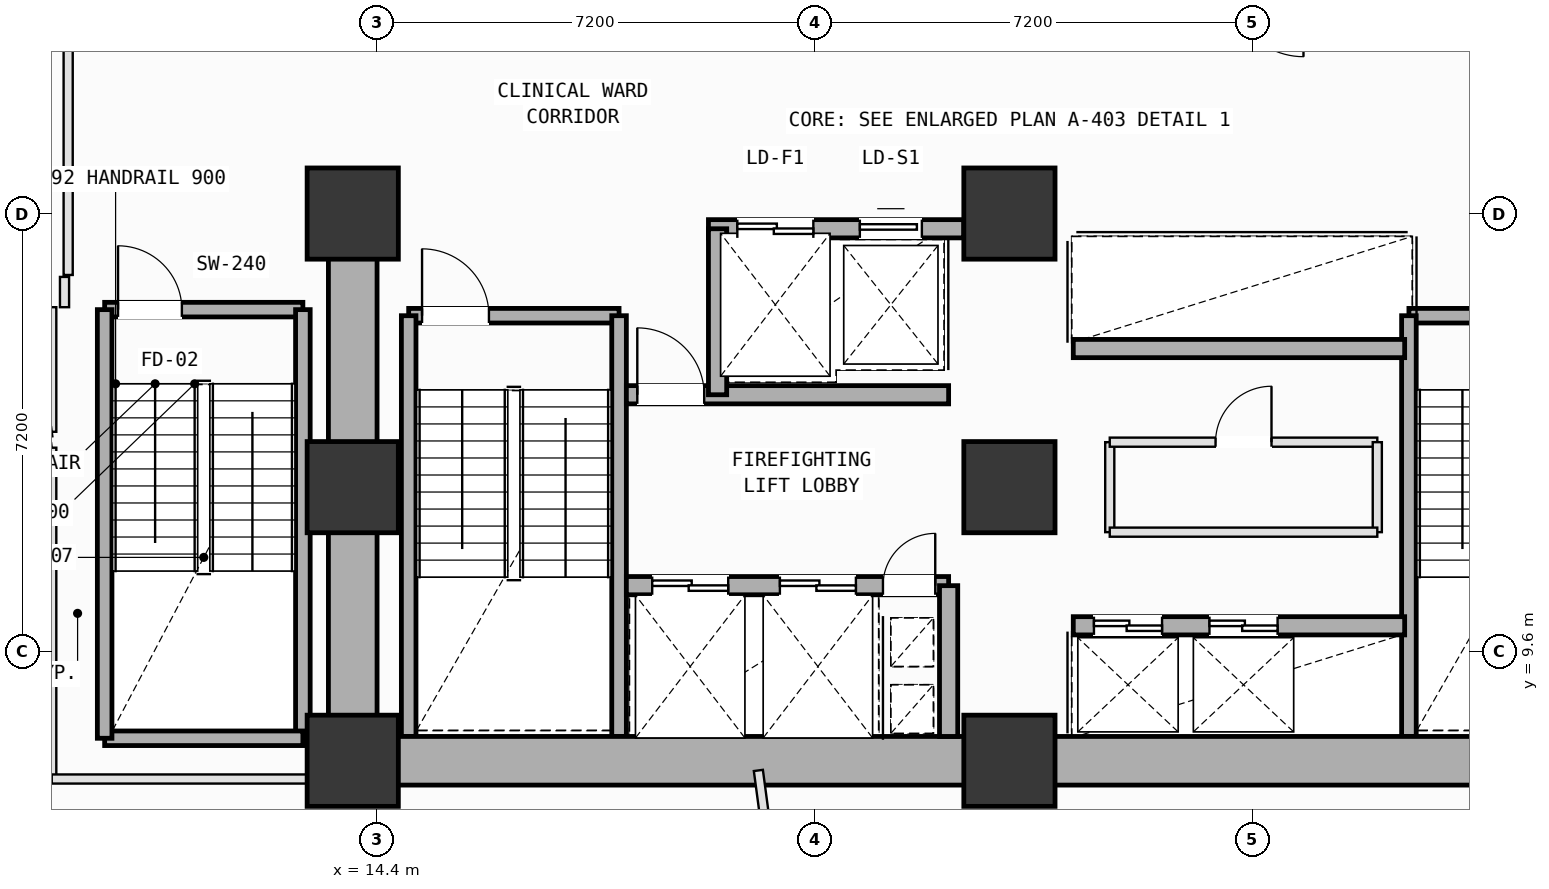
"""IFC4 building model, lengths in metres.
Left out: names, types, materials, properties, quantities, classifications, styles, units other than length and angle.
Written with IfcOpenShell. Run it as: python <this file> out.ifc"""

import sys

from ifc_helpers import new_model, si_unit, direction, frame, frame_2d, origin, origin_2d, place, context, subcontext, project, spatial, rectangle, extrude, element, fill, save


model = new_model("IFC4")
c1 = context("Model", 3, precision=1e-05, world=origin(), true_north=direction((0.0, 1.0)))
c2 = subcontext(c1, "Body", "Model", "MODEL_VIEW")
j1 = project(units=[si_unit("LENGTHUNIT", "METRE"), si_unit("PLANEANGLEUNIT", "RADIAN")], contexts=[c1])
p1 = place(None, origin())
s1 = spatial("IfcSite", under=j1, at=p1, CompositionType="ELEMENT")
p2 = place(p1, origin())
s2 = spatial("IfcBuilding", under=s1, at=p2, CompositionType="ELEMENT")
p3 = place(p2, frame((0.0, 0.0, 55.0)))
s3 = spatial("IfcBuildingStorey", under=s2, at=p3, CompositionType="ELEMENT", Elevation=55.0)
for number, where, z_axis, x_axis in (
    (1, (14.0, 7.8, 0.0), (0.0, 0.0, 1.0), (1.0, 0.0, 0.0)),
    (2, (14.0, 12.3, 0.0), (0.0, 0.0, 1.0), (1.0, 0.0, 0.0)),
    (3, (14.0, 16.8, 0.0), (0.0, 0.0, 1.0), (1.0, 0.0, 0.0)),
    (4, (24.8, 7.8, 0.0), (0.0, 0.0, 1.0), (1.0, 0.0, 0.0)),
    (5, (24.8, 12.3, 0.0), (0.0, 0.0, 1.0), (1.0, 0.0, 0.0)),
    (6, (24.8, 16.8, 0.0), (0.0, 0.0, 1.0), (1.0, 0.0, 0.0)),
):
    element("IfcColumn", number, at=place(p3, frame(where, z_axis=z_axis, x_axis=x_axis)), inside=s3, PredefinedType="COLUMN", context=c2, shape_type="SweptSolid", body=[
        extrude(rectangle(XDim=1.5, YDim=1.5, at=origin_2d()), origin(), (0.0, 0.0, 1.0), 4.0),
    ])
p4 = place(p3, frame((8.19, 7.689, 0.002), z_axis=(0.071206194671, -0.103870142695, 0.992038644054), x_axis=(-0.66508150419, 0.736263995818, 0.124827566051)))
e7 = element("IfcColumn", 7, at=p4, inside=s3, PredefinedType="COLUMN", context=c2, shape_type="SweptSolid", body=[
    extrude(rectangle(XDim=1.6, YDim=0.9, at=origin_2d()), origin(), (0.0, 0.0, 1.0), 4.029),
])
p5 = place(p3, frame((14.92, 15.12, 0.0), z_axis=(0.0, 0.0, 1.0), x_axis=(1.0, 0.0, 0.0)))
e8 = element("IfcWall", 8, at=p5, inside=s3, PredefinedType="SOLIDWALL", context=c2, shape_type="SweptSolid", body=[
    extrude(rectangle(XDim=3.46, YDim=0.24, at=frame_2d((1.73, 0.0))), origin(), (0.0, 0.0, 1.0), 3.78),
])
p6 = place(p5, frame((0.22, 0.0, 0.0)))
e9 = element("IfcOpeningElement", 9, at=p6, cuts=e8, PredefinedType="OPENING", context=c2, shape_type="SweptSolid", body=[
    extrude(rectangle(XDim=1.1, YDim=2.15, at=frame_2d((0.55, 1.075))), frame((0.0, 0.13, 0.0), z_axis=(0.0, -1.0, 0.0), x_axis=(1.0, 0.0, 0.0)), (0.0, 0.0, 1.0), 0.26),
])
for number, where, z_axis, x_axis in (
    (10, (18.38, 15.12, 0.0), (0.0, 0.0, 1.0), (0.0, -1.0, 0.0)),
    (11, (14.92, 8.2, 0.0), (0.0, 0.0, 1.0), (0.0, 1.0, 0.0)),
):
    element("IfcWall", number, at=place(p3, frame(where, z_axis=z_axis, x_axis=x_axis)), inside=s3, PredefinedType="SOLIDWALL", context=c2, shape_type="SweptSolid", body=[
        extrude(rectangle(XDim=6.92, YDim=0.24, at=frame_2d((3.46, 0.0))), origin(), (0.0, 0.0, 1.0), 3.78),
    ])
p7 = place(p3, frame((31.37, 15.12, 0.0), z_axis=(0.0, 0.0, 1.0), x_axis=(1.0, 0.0, 0.0)))
e12 = element("IfcWall", 12, at=p7, inside=s3, PredefinedType="SOLIDWALL", context=c2, shape_type="SweptSolid", body=[
    extrude(rectangle(XDim=3.46, YDim=0.24, at=frame_2d((1.73, 0.0))), origin(), (0.0, 0.0, 1.0), 3.78),
])
p8 = place(p7, frame((2.14, 0.0, 0.0)))
e13 = element("IfcOpeningElement", 13, at=p8, cuts=e12, PredefinedType="OPENING", context=c2, shape_type="SweptSolid", body=[
    extrude(rectangle(XDim=1.1, YDim=2.15, at=frame_2d((0.55, 1.075))), frame((0.0, 0.13, 0.0), z_axis=(0.0, -1.0, 0.0), x_axis=(1.0, 0.0, 0.0)), (0.0, 0.0, 1.0), 0.26),
])
p9 = place(p3, frame((31.37, 8.2, 0.0), z_axis=(0.0, 0.0, 1.0), x_axis=(0.0, 1.0, 0.0)))
e14 = element("IfcWall", 14, at=p9, inside=s3, PredefinedType="SOLIDWALL", context=c2, shape_type="SweptSolid", body=[
    extrude(rectangle(XDim=6.92, YDim=0.24, at=frame_2d((3.46, 0.0))), origin(), (0.0, 0.0, 1.0), 3.78),
])
p10 = place(p3, frame((9.92, 15.22, 0.0), z_axis=(0.0, 0.0, 1.0), x_axis=(1.0, 0.0, 0.0)))
e15 = element("IfcWall", 15, at=p10, inside=s3, PredefinedType="SOLIDWALL", context=c2, shape_type="SweptSolid", body=[
    extrude(rectangle(XDim=3.26, YDim=0.24, at=frame_2d((1.63, 0.0))), origin(), (0.0, 0.0, 1.0), 3.78),
])
p11 = place(p10, frame((0.22, 0.0, 0.0)))
e16 = element("IfcOpeningElement", 16, at=p11, cuts=e15, PredefinedType="OPENING", context=c2, shape_type="SweptSolid", body=[
    extrude(rectangle(XDim=1.05, YDim=2.15, at=frame_2d((0.525, 1.075))), frame((0.0, 0.13, 0.0), z_axis=(0.0, -1.0, 0.0), x_axis=(1.0, 0.0, 0.0)), (0.0, 0.0, 1.0), 0.26),
])
p12 = place(p3, frame((13.18, 15.22, 0.0), z_axis=(0.0, 0.0, 1.0), x_axis=(0.0, -1.0, 0.0)))
e17 = element("IfcWall", 17, at=p12, inside=s3, PredefinedType="SOLIDWALL", context=c2, shape_type="SweptSolid", body=[
    extrude(rectangle(XDim=7.05, YDim=0.24, at=frame_2d((3.525, 0.0))), origin(), (0.0, 0.0, 1.0), 3.78),
])
p13 = place(p3, frame((13.18, 8.17, 0.0), z_axis=(0.0, 0.0, 1.0), x_axis=(-1.0, 0.0, 0.0)))
e18 = element("IfcWall", 18, at=p13, inside=s3, PredefinedType="SOLIDWALL", context=c2, shape_type="SweptSolid", body=[
    extrude(rectangle(XDim=3.26, YDim=0.24, at=frame_2d((1.63, 0.0))), origin(), (0.0, 0.0, 1.0), 3.78),
])
p14 = place(p3, frame((9.92, 8.17, 0.0), z_axis=(0.0, 0.0, 1.0), x_axis=(0.0, 1.0, 0.0)))
e19 = element("IfcWall", 19, at=p14, inside=s3, PredefinedType="SOLIDWALL", context=c2, shape_type="SweptSolid", body=[
    extrude(rectangle(XDim=7.05, YDim=0.24, at=frame_2d((3.525, 0.0))), origin(), (0.0, 0.0, 1.0), 3.78),
])
for number, where, z_axis, x_axis in (
    (20, (14.0, 7.8, 0.0), (0.0, 0.0, 1.0), (1.0, 0.0, 0.0)),
    (21, (24.8, 7.8, 0.0), (0.0, 0.0, 1.0), (1.0, 0.0, 0.0)),
):
    element("IfcWall", number, at=place(p3, frame(where, z_axis=z_axis, x_axis=x_axis)), inside=s3, PredefinedType="SHEAR", context=c2, shape_type="SweptSolid", body=[
        extrude(rectangle(XDim=10.8, YDim=0.8, at=frame_2d((5.4, 0.0))), origin(), (0.0, 0.0, 1.0), 3.78),
    ])
p15 = place(p3, frame((14.0, 16.8, 0.0), z_axis=(0.0, 0.0, 1.0), x_axis=(0.0, -1.0, 0.0)))
e22 = element("IfcWall", 22, at=p15, inside=s3, PredefinedType="SHEAR", context=c2, shape_type="SweptSolid", body=[
    extrude(rectangle(XDim=9.0, YDim=0.8, at=frame_2d((4.5, 0.0))), origin(), (0.0, 0.0, 1.0), 3.78),
])
p16 = place(p3, frame((19.85, 16.55, 0.0), z_axis=(0.0, 0.0, 1.0), x_axis=(1.0, 0.0, 0.0)))
e23 = element("IfcWall", 23, at=p16, inside=s3, PredefinedType="SOLIDWALL", context=c2, shape_type="SweptSolid", body=[
    extrude(rectangle(XDim=4.2, YDim=0.3, at=frame_2d((2.1, 0.0))), origin(), (0.0, 0.0, 1.0), 3.78),
])
p17 = place(p16, frame((0.475, 0.0, 0.0)))
e24 = element("IfcOpeningElement", 24, at=p17, cuts=e23, PredefinedType="OPENING", context=c2, shape_type="SweptSolid", body=[
    extrude(rectangle(XDim=1.25, YDim=2.18, at=frame_2d((0.625, 1.09))), frame((0.0, 0.16, 0.0), z_axis=(0.0, -1.0, 0.0), x_axis=(1.0, 0.0, 0.0)), (0.0, 0.0, 1.0), 0.32),
])
p18 = place(p16, frame((2.49, 0.0, 0.0)))
e25 = element("IfcOpeningElement", 25, at=p18, cuts=e23, PredefinedType="OPENING", context=c2, shape_type="SweptSolid", body=[
    extrude(rectangle(XDim=1.02, YDim=2.12, at=frame_2d((0.51, 1.06))), frame((0.0, 0.16, 0.0), z_axis=(0.0, -1.0, 0.0), x_axis=(1.0, 0.0, 0.0)), (0.0, 0.0, 1.0), 0.32),
])
p19 = place(p3, frame((18.5, 10.68, 0.0), z_axis=(0.0, 0.0, 1.0), x_axis=(1.0, 0.0, 0.0)))
e26 = element("IfcWall", 26, at=p19, inside=s3, PredefinedType="SOLIDWALL", context=c2, shape_type="SweptSolid", body=[
    extrude(rectangle(XDim=5.3, YDim=0.3, at=frame_2d((2.65, 0.0))), origin(), (0.0, 0.0, 1.0), 3.78),
])
p20 = place(p19, frame((4.22, 0.0, 0.0)))
e27 = element("IfcOpeningElement", 27, at=p20, cuts=e26, PredefinedType="OPENING", context=c2, shape_type="SweptSolid", body=[
    extrude(rectangle(XDim=0.86, YDim=2.06, at=frame_2d((0.43, 1.03))), frame((0.0, 0.16, 0.0), z_axis=(0.0, -1.0, 0.0), x_axis=(1.0, 0.0, 0.0)), (0.0, 0.0, 1.0), 0.32),
])
p21 = place(p19, frame((0.425, 0.0, 0.0)))
e28 = element("IfcOpeningElement", 28, at=p21, cuts=e26, PredefinedType="OPENING", context=c2, shape_type="SweptSolid", body=[
    extrude(rectangle(XDim=1.25, YDim=2.18, at=frame_2d((0.625, 1.09))), frame((0.0, 0.16, 0.0), z_axis=(0.0, -1.0, 0.0), x_axis=(1.0, 0.0, 0.0)), (0.0, 0.0, 1.0), 0.32),
])
p22 = place(p19, frame((2.525, 0.0, 0.0)))
e29 = element("IfcOpeningElement", 29, at=p22, cuts=e26, PredefinedType="OPENING", context=c2, shape_type="SweptSolid", body=[
    extrude(rectangle(XDim=1.25, YDim=2.18, at=frame_2d((0.625, 1.09))), frame((0.0, 0.16, 0.0), z_axis=(0.0, -1.0, 0.0), x_axis=(1.0, 0.0, 0.0)), (0.0, 0.0, 1.0), 0.32),
])
p23 = place(p3, frame((18.5, 13.82, 0.0), z_axis=(0.0, 0.0, 1.0), x_axis=(1.0, 0.0, 0.0)))
e30 = element("IfcWall", 30, at=p23, inside=s3, PredefinedType="SOLIDWALL", context=c2, shape_type="SweptSolid", body=[
    extrude(rectangle(XDim=5.3, YDim=0.3, at=frame_2d((2.65, 0.0))), origin(), (0.0, 0.0, 1.0), 3.78),
])
p24 = place(p23, frame((0.18, 0.0, 0.0)))
e31 = element("IfcOpeningElement", 31, at=p24, cuts=e30, PredefinedType="OPENING", context=c2, shape_type="SweptSolid", body=[
    extrude(rectangle(XDim=1.1, YDim=2.15, at=frame_2d((0.55, 1.075))), frame((0.0, 0.16, 0.0), z_axis=(0.0, -1.0, 0.0), x_axis=(1.0, 0.0, 0.0)), (0.0, 0.0, 1.0), 0.32),
])
p25 = place(p3, frame((23.8, 8.2, 0.0), z_axis=(0.0, 0.0, 1.0), x_axis=(0.0, 1.0, 0.0)))
e32 = element("IfcWall", 32, at=p25, inside=s3, PredefinedType="SOLIDWALL", context=c2, shape_type="SweptSolid", body=[
    extrude(rectangle(XDim=2.48, YDim=0.3, at=frame_2d((1.24, 0.0))), origin(), (0.0, 0.0, 1.0), 3.78),
])
p26 = place(p3, frame((20.0, 13.82, 0.0), z_axis=(0.0, 0.0, 1.0), x_axis=(0.0, 1.0, 0.0)))
e33 = element("IfcWall", 33, at=p26, inside=s3, PredefinedType="SOLIDWALL", context=c2, shape_type="SweptSolid", body=[
    extrude(rectangle(XDim=2.73, YDim=0.3, at=frame_2d((1.365, 0.0))), origin(), (0.0, 0.0, 1.0), 3.78),
])
p27 = place(p3, frame((25.85, 10.02, 0.0), z_axis=(0.0, 0.0, 1.0), x_axis=(1.0, 0.0, 0.0)))
e34 = element("IfcWall", 34, at=p27, inside=s3, PredefinedType="SOLIDWALL", context=c2, shape_type="SweptSolid", body=[
    extrude(rectangle(XDim=5.45, YDim=0.3, at=frame_2d((2.725, 0.0))), origin(), (0.0, 0.0, 1.0), 3.78),
])
p28 = place(p27, frame((0.34, 0.0, 0.0)))
e35 = element("IfcOpeningElement", 35, at=p28, cuts=e34, PredefinedType="OPENING", context=c2, shape_type="SweptSolid", body=[
    extrude(rectangle(XDim=1.12, YDim=2.15, at=frame_2d((0.56, 1.075))), frame((0.0, 0.16, 0.0), z_axis=(0.0, -1.0, 0.0), x_axis=(1.0, 0.0, 0.0)), (0.0, 0.0, 1.0), 0.32),
])
p29 = place(p27, frame((2.24, 0.0, 0.0)))
e36 = element("IfcOpeningElement", 36, at=p29, cuts=e34, PredefinedType="OPENING", context=c2, shape_type="SweptSolid", body=[
    extrude(rectangle(XDim=1.12, YDim=2.15, at=frame_2d((0.56, 1.075))), frame((0.0, 0.16, 0.0), z_axis=(0.0, -1.0, 0.0), x_axis=(1.0, 0.0, 0.0)), (0.0, 0.0, 1.0), 0.32),
])
p30 = place(p3, frame((25.85, 14.58, 0.0), z_axis=(0.0, 0.0, 1.0), x_axis=(1.0, 0.0, 0.0)))
e37 = element("IfcWall", 37, at=p30, inside=s3, PredefinedType="SOLIDWALL", context=c2, shape_type="SweptSolid", body=[
    extrude(rectangle(XDim=5.45, YDim=0.3, at=frame_2d((2.725, 0.0))), origin(), (0.0, 0.0, 1.0), 3.78),
])
p31 = place(p3, frame((26.45, 11.56, 0.0), z_axis=(0.0, 0.0, 1.0), x_axis=(0.0, 1.0, 0.0)))
e38 = element("IfcWall", 38, at=p31, inside=s3, PredefinedType="PARTITIONING", context=c2, shape_type="SweptSolid", body=[
    extrude(rectangle(XDim=1.48, YDim=0.15, at=frame_2d((0.74, 0.0))), origin(), (0.0, 0.0, 1.0), 3.78),
])
p32 = place(p3, frame((26.45, 13.04, 0.0), z_axis=(0.0, 0.0, 1.0), x_axis=(1.0, 0.0, 0.0)))
e39 = element("IfcWall", 39, at=p32, inside=s3, PredefinedType="PARTITIONING", context=c2, shape_type="SweptSolid", body=[
    extrude(rectangle(XDim=4.4, YDim=0.15, at=frame_2d((2.2, 0.0))), origin(), (0.0, 0.0, 1.0), 3.78),
])
p33 = place(p32, frame((1.74, 0.0, 0.0)))
e40 = element("IfcOpeningElement", 40, at=p33, cuts=e39, PredefinedType="OPENING", context=c2, shape_type="SweptSolid", body=[
    extrude(rectangle(XDim=0.92, YDim=2.1, at=frame_2d((0.46, 1.05))), frame((0.0, 0.085, 0.0), z_axis=(0.0, -1.0, 0.0), x_axis=(1.0, 0.0, 0.0)), (0.0, 0.0, 1.0), 0.17),
])
p34 = place(p3, frame((30.85, 13.04, 0.0), z_axis=(0.0, 0.0, 1.0), x_axis=(0.0, -1.0, 0.0)))
e41 = element("IfcWall", 41, at=p34, inside=s3, PredefinedType="PARTITIONING", context=c2, shape_type="SweptSolid", body=[
    extrude(rectangle(XDim=1.48, YDim=0.15, at=frame_2d((0.74, 0.0))), origin(), (0.0, 0.0, 1.0), 3.78),
])
p35 = place(p3, frame((30.85, 11.56, 0.0), z_axis=(0.0, 0.0, 1.0), x_axis=(-1.0, 0.0, 0.0)))
e42 = element("IfcWall", 42, at=p35, inside=s3, PredefinedType="PARTITIONING", context=c2, shape_type="SweptSolid", body=[
    extrude(rectangle(XDim=4.4, YDim=0.15, at=frame_2d((2.2, 0.0))), origin(), (0.0, 0.0, 1.0), 3.78),
])
p36 = place(p3, frame((7.649, 12.762, 0.0), z_axis=(0.0, 0.0, 1.0), x_axis=(0.99120979028, 0.132299477148, 0.0)))
e43 = element("IfcWall", 43, at=p36, inside=s3, PredefinedType="PARTITIONING", context=c2, shape_type="SweptSolid", body=[
    extrude(rectangle(XDim=1.414, YDim=0.15, at=frame_2d((0.707, 0.0))), origin(), (0.0, 0.0, 1.0), 3.78),
])
p37 = place(p3, frame((9.05, 12.949, 0.0), z_axis=(0.0, 0.0, 1.0), x_axis=(0.0, -1.0, 0.0)))
e44 = element("IfcWall", 44, at=p37, inside=s3, PredefinedType="PARTITIONING", context=c2, shape_type="SweptSolid", body=[
    extrude(rectangle(XDim=5.449, YDim=0.15, at=frame_2d((2.725, 0.0))), origin(), (0.0, 0.0, 1.0), 3.78),
])
p38 = place(p3, frame((9.05, 7.5, 0.0), z_axis=(0.0, 0.0, 1.0), x_axis=(1.0, 0.0, 0.0)))
e45 = element("IfcWall", 45, at=p38, inside=s3, PredefinedType="PARTITIONING", context=c2, shape_type="SweptSolid", body=[
    extrude(rectangle(XDim=4.95, YDim=0.15, at=frame_2d((2.475, 0.0))), origin(), (0.0, 0.0, 1.0), 3.78),
])
p39 = place(p3, frame((20.671, 7.641, 0.0), z_axis=(0.0, 0.0, 1.0), x_axis=(0.132330273693, -0.991205679294, 0.0)))
e46 = element("IfcWall", 46, at=p39, inside=s3, PredefinedType="PARTITIONING", context=c2, shape_type="SweptSolid", body=[
    extrude(rectangle(XDim=6.817, YDim=0.15, at=frame_2d((3.409, 0.0))), origin(), (0.0, 0.0, 1.0), 3.78),
])
p40 = place(p39, frame((3.13, 0.0, 0.0)))
e47 = element("IfcOpeningElement", 47, at=p40, cuts=e46, PredefinedType="OPENING", context=c2, shape_type="SweptSolid", body=[
    extrude(rectangle(XDim=0.86, YDim=2.06, at=frame_2d((0.43, 1.03))), frame((0.0, 0.085, 0.0), z_axis=(0.0, -1.0, 0.0), x_axis=(1.0, 0.0, 0.0)), (0.0, 0.0, 1.0), 0.17),
])
p41 = place(p3, frame((9.32, 20.55, 0.0), z_axis=(0.0, 0.0, 1.0), x_axis=(0.0, -1.0, 0.0)))
e48 = element("IfcWall", 48, at=p41, inside=s3, PredefinedType="PARTITIONING", context=c2, shape_type="SweptSolid", body=[
    extrude(rectangle(XDim=4.76, YDim=0.15, at=frame_2d((2.38, 0.0))), origin(), (0.0, 0.0, 1.0), 3.78),
])
p42 = place(p3, frame((9.26, 15.758, 0.0), z_axis=(0.0, 0.0, 1.0), x_axis=(0.0, -1.0, 0.0)))
e49 = element("IfcWall", 49, at=p42, inside=s3, PredefinedType="PARTITIONING", context=c2, shape_type="SweptSolid", body=[
    extrude(rectangle(XDim=0.498, YDim=0.15, at=frame_2d((0.249, 0.0))), origin(), (0.0, 0.0, 1.0), 3.78),
])
p43 = place(p3, frame((9.05, 15.26, 0.0), z_axis=(0.0, 0.0, 1.0), x_axis=(0.0, -1.0, 0.0)))
e50 = element("IfcWall", 50, at=p43, inside=s3, PredefinedType="PARTITIONING", context=c2, shape_type="SweptSolid", body=[
    extrude(rectangle(XDim=2.049, YDim=0.15, at=frame_2d((1.024, 0.0))), origin(), (0.0, 0.0, 1.0), 3.78),
])
p44 = place(p3, frame((9.05, 13.211, 0.0), z_axis=(0.0, 0.0, 1.0), x_axis=(-0.991266152883, -0.131876510982, 0.0)))
e51 = element("IfcWall", 51, at=p44, inside=s3, PredefinedType="PARTITIONING", context=c2, shape_type="SweptSolid", body=[
    extrude(rectangle(XDim=1.448, YDim=0.15, at=frame_2d((0.724, 0.0))), origin(), (0.0, 0.0, 1.0), 3.78),
])
p45 = place(p6, origin())
e52 = element("IfcDoor", 52, at=p45, inside=s3, OperationType="SINGLE_SWING_LEFT", PredefinedType="DOOR", context=c2, shape_type="SweptSolid", body=[
    extrude(rectangle(XDim=1.1, YDim=2.15, at=frame_2d((0.55, 1.075))), frame((0.0, 0.025, 0.0), z_axis=(0.0, -1.0, 0.0), x_axis=(1.0, 0.0, 0.0)), (0.0, 0.0, 1.0), 0.05),
])
fill(e9, e52)
p46 = place(p11, origin())
e53 = element("IfcDoor", 53, at=p46, inside=s3, OperationType="SINGLE_SWING_LEFT", PredefinedType="DOOR", context=c2, shape_type="SweptSolid", body=[
    extrude(rectangle(XDim=1.05, YDim=2.15, at=frame_2d((0.525, 1.075))), frame((0.0, 0.025, 0.0), z_axis=(0.0, -1.0, 0.0), x_axis=(1.0, 0.0, 0.0)), (0.0, 0.0, 1.0), 0.05),
])
fill(e16, e53)
p47 = place(p20, origin())
e54 = element("IfcDoor", 54, at=p47, inside=s3, OperationType="SINGLE_SWING_RIGHT", PredefinedType="DOOR", context=c2, shape_type="SweptSolid", body=[
    extrude(rectangle(XDim=0.86, YDim=2.06, at=frame_2d((0.43, 1.03))), frame((0.0, 0.025, 0.0), z_axis=(0.0, -1.0, 0.0), x_axis=(1.0, 0.0, 0.0)), (0.0, 0.0, 1.0), 0.05),
])
fill(e27, e54)
p48 = place(p24, origin())
e55 = element("IfcDoor", 55, at=p48, inside=s3, OperationType="SINGLE_SWING_LEFT", PredefinedType="DOOR", context=c2, shape_type="SweptSolid", body=[
    extrude(rectangle(XDim=1.1, YDim=2.15, at=frame_2d((0.55, 1.075))), frame((0.0, 0.025, 0.0), z_axis=(0.0, -1.0, 0.0), x_axis=(1.0, 0.0, 0.0)), (0.0, 0.0, 1.0), 0.05),
])
fill(e31, e55)
p49 = place(p21, origin())
e56 = element("IfcDoor", 56, at=p49, inside=s3, OperationType="DOUBLE_DOOR_SLIDING", PredefinedType="DOOR", context=c2, shape_type="SweptSolid", body=[
    extrude(rectangle(XDim=1.25, YDim=2.18, at=frame_2d((0.625, 1.09))), frame((0.0, 0.025, 0.0), z_axis=(0.0, -1.0, 0.0), x_axis=(1.0, 0.0, 0.0)), (0.0, 0.0, 1.0), 0.05),
])
fill(e28, e56)
p50 = place(p22, origin())
e57 = element("IfcDoor", 57, at=p50, inside=s3, OperationType="DOUBLE_DOOR_SLIDING", PredefinedType="DOOR", context=c2, shape_type="SweptSolid", body=[
    extrude(rectangle(XDim=1.25, YDim=2.18, at=frame_2d((0.625, 1.09))), frame((0.0, 0.025, 0.0), z_axis=(0.0, -1.0, 0.0), x_axis=(1.0, 0.0, 0.0)), (0.0, 0.0, 1.0), 0.05),
])
fill(e29, e57)
p51 = place(p28, origin())
e58 = element("IfcDoor", 58, at=p51, inside=s3, OperationType="DOUBLE_DOOR_SLIDING", PredefinedType="DOOR", context=c2, shape_type="SweptSolid", body=[
    extrude(rectangle(XDim=1.12, YDim=2.15, at=frame_2d((0.56, 1.075))), frame((0.0, 0.025, 0.0), z_axis=(0.0, -1.0, 0.0), x_axis=(1.0, 0.0, 0.0)), (0.0, 0.0, 1.0), 0.05),
])
fill(e35, e58)
p52 = place(p29, origin())
e59 = element("IfcDoor", 59, at=p52, inside=s3, OperationType="DOUBLE_DOOR_SLIDING", PredefinedType="DOOR", context=c2, shape_type="SweptSolid", body=[
    extrude(rectangle(XDim=1.12, YDim=2.15, at=frame_2d((0.56, 1.075))), frame((0.0, 0.025, 0.0), z_axis=(0.0, -1.0, 0.0), x_axis=(1.0, 0.0, 0.0)), (0.0, 0.0, 1.0), 0.05),
])
fill(e36, e59)
p53 = place(p17, origin())
e60 = element("IfcDoor", 60, at=p53, inside=s3, OperationType="DOUBLE_DOOR_SLIDING", PredefinedType="DOOR", context=c2, shape_type="SweptSolid", body=[
    extrude(rectangle(XDim=1.25, YDim=2.18, at=frame_2d((0.625, 1.09))), frame((0.0, 0.025, 0.0), z_axis=(0.0, -1.0, 0.0), x_axis=(1.0, 0.0, 0.0)), (0.0, 0.0, 1.0), 0.05),
])
fill(e24, e60)
p54 = place(p18, origin())
e61 = element("IfcDoor", 61, at=p54, inside=s3, OperationType="SLIDING_TO_LEFT", PredefinedType="DOOR", context=c2, shape_type="SweptSolid", body=[
    extrude(rectangle(XDim=1.02, YDim=2.12, at=frame_2d((0.51, 1.06))), frame((0.0, 0.025, 0.0), z_axis=(0.0, -1.0, 0.0), x_axis=(1.0, 0.0, 0.0)), (0.0, 0.0, 1.0), 0.05),
])
fill(e25, e61)
p55 = place(p33, origin())
e62 = element("IfcDoor", 62, at=p55, inside=s3, OperationType="SINGLE_SWING_RIGHT", PredefinedType="DOOR", context=c2, shape_type="SweptSolid", body=[
    extrude(rectangle(XDim=0.92, YDim=2.1, at=frame_2d((0.46, 1.05))), frame((0.0, 0.025, 0.0), z_axis=(0.0, -1.0, 0.0), x_axis=(1.0, 0.0, 0.0)), (0.0, 0.0, 1.0), 0.05),
])
fill(e40, e62)
save(model, sys.argv[1])
